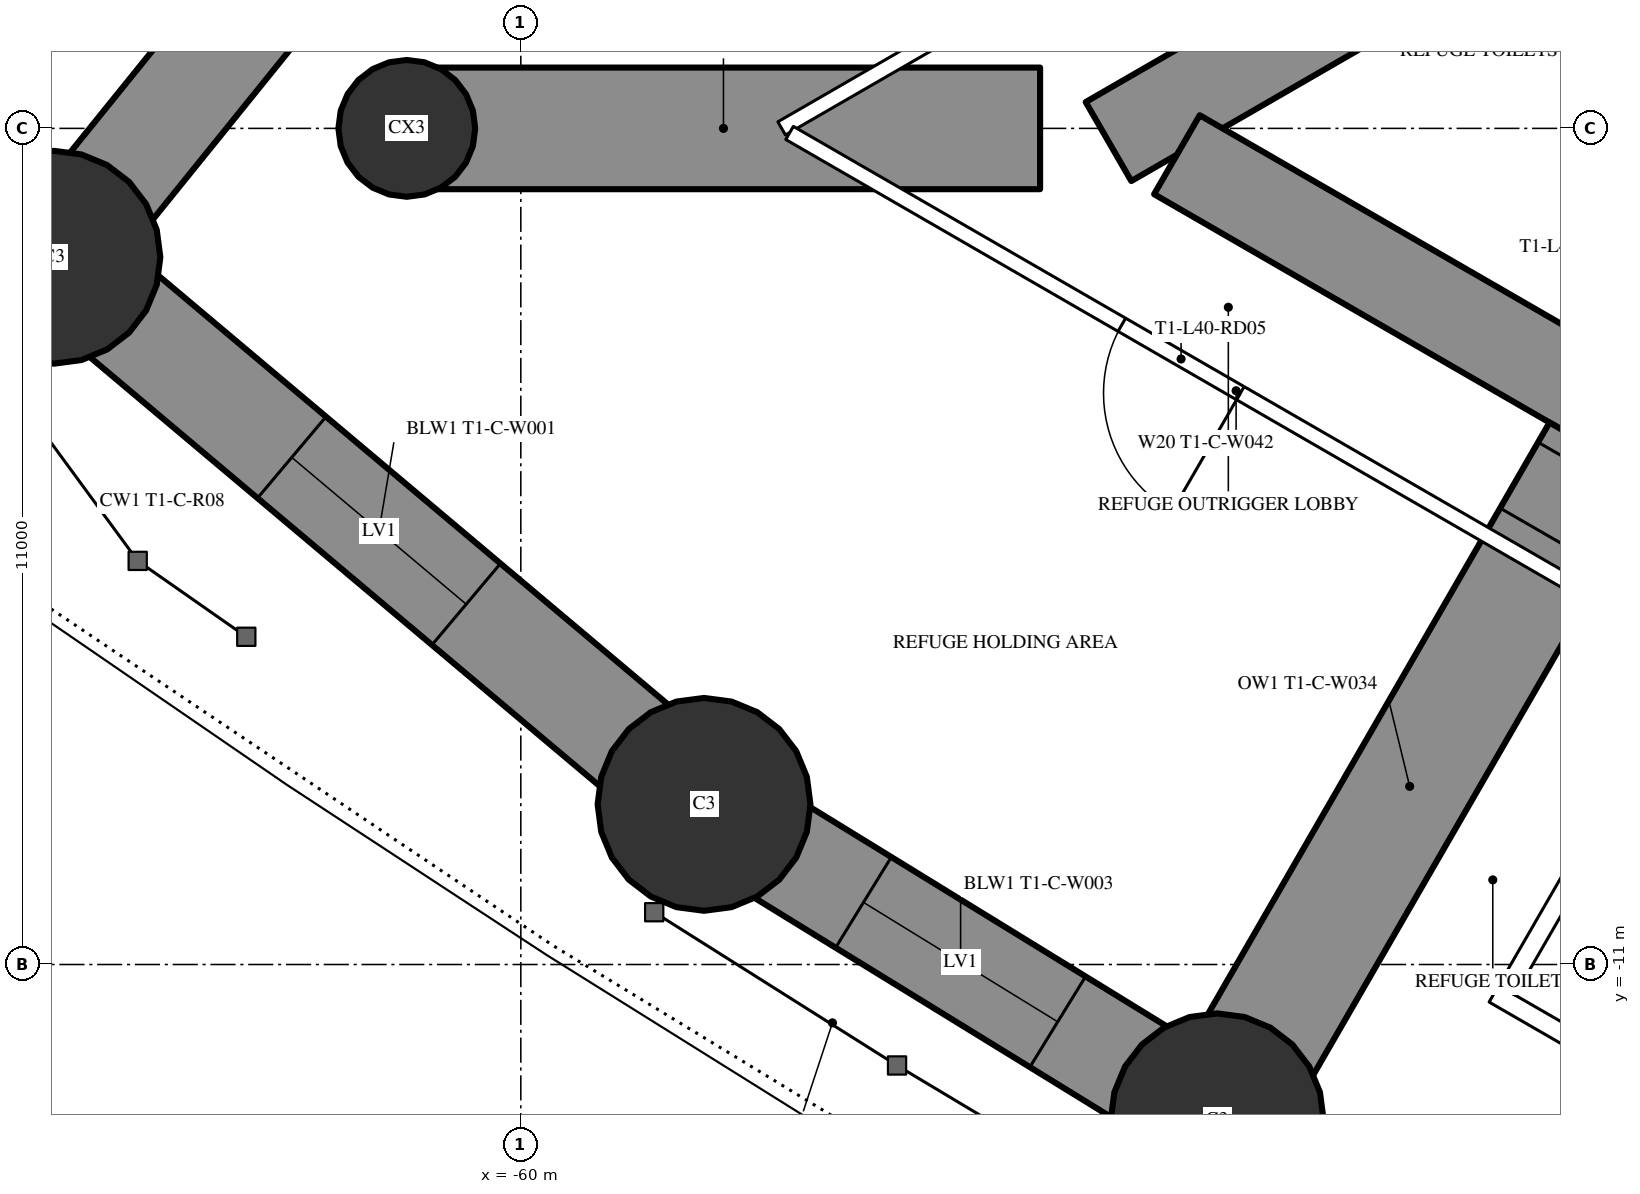
"""IFC4 building model, lengths in metres.
Left out: names, types, materials, properties, quantities, classifications, styles, units other than length and angle.
Written with IfcOpenShell. Run it as: python <this file> out.ifc"""

import sys

from ifc_helpers import new_model, si_unit, direction, frame, frame_2d, origin, origin_2d, place, context, subcontext, project, spatial, rectangle, circle, extrude, element, fill, save


model = new_model("IFC4")
c1 = context("Model", 3, precision=1e-05, world=origin(), true_north=direction((0.0, 1.0)))
c2 = subcontext(c1, "Body", "Model", "MODEL_VIEW")
j1 = project(units=[si_unit("LENGTHUNIT", "METRE"), si_unit("PLANEANGLEUNIT", "RADIAN")], contexts=[c1])
p1 = place(None, origin())
s1 = spatial("IfcSite", under=j1, at=p1, CompositionType="ELEMENT")
p2 = place(p1, origin())
s2 = spatial("IfcBuilding", under=s1, at=p2, CompositionType="ELEMENT")
p3 = place(p2, frame((0.0, 0.0, 152.7)))
s3 = spatial("IfcBuildingStorey", under=s2, at=p3, CompositionType="ELEMENT", Elevation=152.7)
for number, where, z_axis, x_axis in (
    (1, (-66.143, -1.695, 0.0), (0.0, 0.0, 1.0), (1.0, 0.0, 0.0)),
    (2, (-57.59, -8.893, 0.0), (0.0, 0.0, 1.0), (1.0, 0.0, 0.0)),
    (3, (-50.839, -13.043, 0.0), (0.0, 0.0, 1.0), (1.0, 0.0, 0.0)),
):
    element("IfcColumn", number, at=place(p3, frame(where, z_axis=z_axis, x_axis=x_axis)), inside=s3, PredefinedType="COLUMN", context=c2, shape_type="SweptSolid", body=[
        extrude(circle(Radius=1.4, at=origin_2d()), origin(), (0.0, 0.0, 1.0), 3.6),
    ])
p4 = place(p3, frame((-61.5, 0.0, 0.0), z_axis=(0.0, 0.0, 1.0), x_axis=(1.0, 0.0, 0.0)))
e4 = element("IfcColumn", 4, at=p4, inside=s3, PredefinedType="COLUMN", context=c2, shape_type="SweptSolid", body=[
    extrude(circle(Radius=0.9, at=origin_2d()), origin(), (0.0, 0.0, 1.0), 3.6),
])
p5 = place(p3, frame((-27.2, 14.3, 0.0), z_axis=(0.0, 0.0, 1.0), x_axis=(-0.866026593062, -0.499997940104, 0.0)))
e5 = element("IfcWall", 5, at=p5, inside=s3, PredefinedType="SHEAR", context=c2, shape_type="SweptSolid", body=[
    extrude(rectangle(XDim=28.946, YDim=1.2, at=frame_2d((14.473, 0.0))), origin(), (0.0, 0.0, 1.0), 3.6),
])
p6 = place(p5, frame((4.6, 0.0, 0.0)))
e6 = element("IfcOpeningElement", 6, at=p6, cuts=e5, PredefinedType="OPENING", context=c2, shape_type="SweptSolid", body=[
    extrude(rectangle(XDim=1.0, YDim=2.2, at=frame_2d((0.5, 1.1))), frame((0.0, 0.61, 0.0), z_axis=(0.0, -1.0, 0.0), x_axis=(1.0, 0.0, 0.0)), (0.0, 0.0, 1.0), 1.22),
])
p7 = place(p5, frame((13.568, 0.0, 0.0)))
e7 = element("IfcOpeningElement", 7, at=p7, cuts=e5, PredefinedType="OPENING", context=c2, shape_type="SweptSolid", body=[
    extrude(rectangle(XDim=1.8, YDim=2.04, at=frame_2d((0.9, 1.02))), frame((0.0, 0.61, 0.0), z_axis=(0.0, -1.0, 0.0), x_axis=(1.0, 0.0, 0.0)), (0.0, 0.0, 1.0), 1.22),
])
p8 = place(p3, frame((-27.2, -14.3, 0.0), z_axis=(0.0, 0.0, 1.0), x_axis=(-0.866024021859, 0.500002393557, 0.0)))
e8 = element("IfcWall", 8, at=p8, inside=s3, PredefinedType="SHEAR", context=c2, shape_type="SweptSolid", body=[
    extrude(rectangle(XDim=27.907, YDim=1.2, at=frame_2d((13.954, 0.0))), origin(), (0.0, 0.0, 1.0), 3.6),
])
p9 = place(p8, frame((4.6, 0.0, 0.0)))
e9 = element("IfcOpeningElement", 9, at=p9, cuts=e8, PredefinedType="OPENING", context=c2, shape_type="SweptSolid", body=[
    extrude(rectangle(XDim=1.0, YDim=2.2, at=frame_2d((0.5, 1.1))), frame((0.0, 0.61, 0.0), z_axis=(0.0, -1.0, 0.0), x_axis=(1.0, 0.0, 0.0)), (0.0, 0.0, 1.0), 1.22),
])
p10 = place(p8, frame((13.818, 0.0, 0.0)))
e10 = element("IfcOpeningElement", 10, at=p10, cuts=e8, PredefinedType="OPENING", context=c2, shape_type="SweptSolid", body=[
    extrude(rectangle(XDim=1.8, YDim=2.2, at=frame_2d((0.9, 1.1))), frame((0.0, 0.61, 0.0), z_axis=(0.0, -1.0, 0.0), x_axis=(1.0, 0.0, 0.0)), (0.0, 0.0, 1.0), 1.22),
])
p11 = place(p3, frame((-53.168, 0.0, 0.0), z_axis=(0.0, 0.0, 1.0), x_axis=(-1.0, 0.0, 0.0)))
e11 = element("IfcWall", 11, at=p11, inside=s3, PredefinedType="SHEAR", context=c2, shape_type="SweptSolid", body=[
    extrude(rectangle(XDim=8.332, YDim=1.6, at=frame_2d((4.166, 0.0))), origin(), (0.0, 0.0, 1.0), 3.6),
])
p12 = place(p3, frame((-45.773, -4.27, 0.0), z_axis=(0.0, 0.0, 1.0), x_axis=(-0.499995723283, -0.866027872934, 0.0)))
e12 = element("IfcWall", 12, at=p12, inside=s3, PredefinedType="SHEAR", context=c2, shape_type="SweptSolid", body=[
    extrude(rectangle(XDim=10.131, YDim=1.6, at=frame_2d((5.065, 0.0))), origin(), (0.0, 0.0, 1.0), 3.6),
])
p13 = place(p12, frame((0.3, 0.0, 0.0)))
e13 = element("IfcOpeningElement", 13, at=p13, cuts=e12, PredefinedType="OPENING", context=c2, shape_type="SweptSolid", body=[
    extrude(rectangle(XDim=1.0, YDim=2.2, at=frame_2d((0.5, 1.1))), frame((0.0, 0.81, 0.0), z_axis=(0.0, -1.0, 0.0), x_axis=(1.0, 0.0, 0.0)), (0.0, 0.0, 1.0), 1.62),
])
p14 = place(p3, frame((-57.59, 8.893, 0.0), z_axis=(0.0, 0.0, 1.0), x_axis=(-0.628373846765, -0.777911504416, 0.0)))
e14 = element("IfcWall", 14, at=p14, inside=s3, PredefinedType="SHEAR", context=c2, shape_type="SweptSolid", body=[
    extrude(rectangle(XDim=13.611, YDim=1.4, at=frame_2d((6.806, 0.0))), origin(), (0.0, 0.0, 1.0), 3.6),
])
p15 = place(p14, frame((5.306, 0.0, 0.6)))
e15 = element("IfcOpeningElement", 15, at=p15, cuts=e14, PredefinedType="OPENING", context=c2, shape_type="SweptSolid", body=[
    extrude(rectangle(XDim=3.0, YDim=1.2, at=frame_2d((1.5, 0.6))), frame((0.0, 0.71, 0.0), z_axis=(0.0, -1.0, 0.0), x_axis=(1.0, 0.0, 0.0)), (0.0, 0.0, 1.0), 1.42),
])
p16 = place(p3, frame((-66.143, -1.695, 0.0), z_axis=(0.0, 0.0, 1.0), x_axis=(0.765120708367, -0.64388687021, 0.0)))
e16 = element("IfcWall", 16, at=p16, inside=s3, PredefinedType="SHEAR", context=c2, shape_type="SweptSolid", body=[
    extrude(rectangle(XDim=11.179, YDim=1.4, at=frame_2d((5.589, 0.0))), origin(), (0.0, 0.0, 1.0), 3.6),
])
p17 = place(p16, frame((4.089, 0.0, 0.6)))
e17 = element("IfcOpeningElement", 17, at=p17, cuts=e16, PredefinedType="OPENING", context=c2, shape_type="SweptSolid", body=[
    extrude(rectangle(XDim=3.0, YDim=1.2, at=frame_2d((1.5, 0.6))), frame((0.0, 0.71, 0.0), z_axis=(0.0, -1.0, 0.0), x_axis=(1.0, 0.0, 0.0)), (0.0, 0.0, 1.0), 1.42),
])
p18 = place(p3, frame((-57.59, -8.893, 0.0), z_axis=(0.0, 0.0, 1.0), x_axis=(0.851892008043, -0.523717487423, 0.0)))
e18 = element("IfcWall", 18, at=p18, inside=s3, PredefinedType="SHEAR", context=c2, shape_type="SweptSolid", body=[
    extrude(rectangle(XDim=7.924, YDim=1.4, at=frame_2d((3.962, 0.0))), origin(), (0.0, 0.0, 1.0), 3.6),
])
p19 = place(p18, frame((2.462, 0.0, 0.6)))
e19 = element("IfcOpeningElement", 19, at=p19, cuts=e18, PredefinedType="OPENING", context=c2, shape_type="SweptSolid", body=[
    extrude(rectangle(XDim=3.0, YDim=1.2, at=frame_2d((1.5, 0.6))), frame((0.0, 0.71, 0.0), z_axis=(0.0, -1.0, 0.0), x_axis=(1.0, 0.0, 0.0)), (0.0, 0.0, 1.0), 1.42),
])
p20 = place(p3, frame((-50.839, -13.043, 0.0), z_axis=(0.0, 0.0, 1.0), x_axis=(0.875577684027, -0.483077342911, 0.0)))
e20 = element("IfcWall", 20, at=p20, inside=s3, PredefinedType="SHEAR", context=c2, shape_type="SweptSolid", body=[
    extrude(rectangle(XDim=7.925, YDim=1.4, at=frame_2d((3.962, 0.0))), origin(), (0.0, 0.0, 1.0), 3.6),
])
p21 = place(p20, frame((2.462, 0.0, 0.6)))
e21 = element("IfcOpeningElement", 21, at=p21, cuts=e20, PredefinedType="OPENING", context=c2, shape_type="SweptSolid", body=[
    extrude(rectangle(XDim=3.0, YDim=1.2, at=frame_2d((1.5, 0.6))), frame((0.0, 0.71, 0.0), z_axis=(0.0, -1.0, 0.0), x_axis=(1.0, 0.0, 0.0)), (0.0, 0.0, 1.0), 1.42),
])
p22 = place(p3, frame((-27.803, 16.608, 0.0), z_axis=(0.0, 0.0, 1.0), x_axis=(-0.866025851808, -0.499999223999, 0.0)))
e22 = element("IfcWall", 22, at=p22, inside=s3, PredefinedType="PARTITIONING", context=c2, shape_type="SweptSolid", body=[
    extrude(rectangle(XDim=33.215, YDim=0.2, at=frame_2d((16.608, 0.0))), origin(), (0.0, 0.0, 1.0), 3.35),
])
p23 = place(p22, frame((4.584, 0.0, 0.0)))
e23 = element("IfcOpeningElement", 23, at=p23, cuts=e22, PredefinedType="OPENING", context=c2, shape_type="SweptSolid", body=[
    extrude(rectangle(XDim=2.0, YDim=2.4, at=frame_2d((1.0, 1.2))), frame((0.0, 0.11, 0.0), z_axis=(0.0, -1.0, 0.0), x_axis=(1.0, 0.0, 0.0)), (0.0, 0.0, 1.0), 0.22),
])
p24 = place(p22, frame((18.1, 0.0, 0.0)))
e24 = element("IfcOpeningElement", 24, at=p24, cuts=e22, PredefinedType="OPENING", context=c2, shape_type="SweptSolid", body=[
    extrude(rectangle(XDim=2.0, YDim=2.4, at=frame_2d((1.0, 1.2))), frame((0.0, 0.11, 0.0), z_axis=(0.0, -1.0, 0.0), x_axis=(1.0, 0.0, 0.0)), (0.0, 0.0, 1.0), 0.22),
])
p25 = place(p22, frame((26.147, 0.0, 0.0)))
e25 = element("IfcOpeningElement", 25, at=p25, cuts=e22, PredefinedType="OPENING", context=c2, shape_type="SweptSolid", body=[
    extrude(rectangle(XDim=2.0, YDim=2.4, at=frame_2d((1.0, 1.2))), frame((0.0, 0.11, 0.0), z_axis=(0.0, -1.0, 0.0), x_axis=(1.0, 0.0, 0.0)), (0.0, 0.0, 1.0), 0.22),
])
p26 = place(p3, frame((-44.715, -6.844, 0.0), z_axis=(0.0, 0.0, 1.0), x_axis=(-0.866025261224, 0.500000246922, 0.0)))
e26 = element("IfcWall", 26, at=p26, inside=s3, PredefinedType="PARTITIONING", context=c2, shape_type="SweptSolid", body=[
    extrude(rectangle(XDim=13.567, YDim=0.2, at=frame_2d((6.783, 0.0))), origin(), (0.0, 0.0, 1.0), 3.35),
])
p27 = place(p26, frame((6.719, 0.0, 0.0)))
e27 = element("IfcOpeningElement", 27, at=p27, cuts=e26, PredefinedType="OPENING", context=c2, shape_type="SweptSolid", body=[
    extrude(rectangle(XDim=1.8, YDim=2.2, at=frame_2d((0.9, 1.1))), frame((0.0, 0.11, 0.0), z_axis=(0.0, -1.0, 0.0), x_axis=(1.0, 0.0, 0.0)), (0.0, 0.0, 1.0), 0.22),
])
p28 = place(p3, frame((-41.482, -14.686, 0.0), z_axis=(0.0, 0.0, 1.0), x_axis=(-0.86603344179, 0.499986077507, 0.0)))
e28 = element("IfcWall", 28, at=p28, inside=s3, PredefinedType="PARTITIONING", context=c2, shape_type="SweptSolid", body=[
    extrude(rectangle(XDim=6.6, YDim=0.25, at=frame_2d((3.3, 0.0))), origin(), (0.0, 0.0, 1.0), 3.35),
])
p29 = place(p3, frame((-45.428, -8.568, 0.0), z_axis=(0.0, 0.0, 1.0), x_axis=(-0.499929347863, -0.866066190972, 0.0)))
e29 = element("IfcWall", 29, at=p29, inside=s3, PredefinedType="PARTITIONING", context=c2, shape_type="SweptSolid", body=[
    extrude(rectangle(XDim=3.201, YDim=0.25, at=frame_2d((1.6, 0.0))), origin(), (0.0, 0.0, 1.0), 3.35),
])
p30 = place(p17, origin())
e30 = element("IfcWindow", 30, at=p30, inside=s3, PartitioningType="SINGLE_PANEL", PredefinedType="WINDOW", context=c2, shape_type="SweptSolid", body=[
    extrude(rectangle(XDim=3.0, YDim=1.2, at=frame_2d((1.5, 0.6))), frame((0.0, 0.03, 0.0), z_axis=(0.0, -1.0, 0.0), x_axis=(1.0, 0.0, 0.0)), (0.0, 0.0, 1.0), 0.06),
])
fill(e17, e30)
p31 = place(p19, origin())
e31 = element("IfcWindow", 31, at=p31, inside=s3, PartitioningType="SINGLE_PANEL", PredefinedType="WINDOW", context=c2, shape_type="SweptSolid", body=[
    extrude(rectangle(XDim=3.0, YDim=1.2, at=frame_2d((1.5, 0.6))), frame((0.0, 0.03, 0.0), z_axis=(0.0, -1.0, 0.0), x_axis=(1.0, 0.0, 0.0)), (0.0, 0.0, 1.0), 0.06),
])
fill(e19, e31)
p32 = place(p13, origin())
e32 = element("IfcDoor", 32, at=p32, inside=s3, OperationType="SINGLE_SWING_LEFT", PredefinedType="DOOR", context=c2, shape_type="SweptSolid", body=[
    extrude(rectangle(XDim=1.0, YDim=2.2, at=frame_2d((0.5, 1.1))), frame((0.0, 0.025, 0.0), z_axis=(0.0, -1.0, 0.0), x_axis=(1.0, 0.0, 0.0)), (0.0, 0.0, 1.0), 0.05),
])
fill(e13, e32)
p33 = place(p27, origin())
e33 = element("IfcDoor", 33, at=p33, inside=s3, OperationType="DOUBLE_DOOR_SINGLE_SWING", PredefinedType="DOOR", context=c2, shape_type="SweptSolid", body=[
    extrude(rectangle(XDim=1.8, YDim=2.2, at=frame_2d((0.9, 1.1))), frame((0.0, 0.025, 0.0), z_axis=(0.0, -1.0, 0.0), x_axis=(1.0, 0.0, 0.0)), (0.0, 0.0, 1.0), 0.05),
])
fill(e27, e33)
save(model, sys.argv[1])
